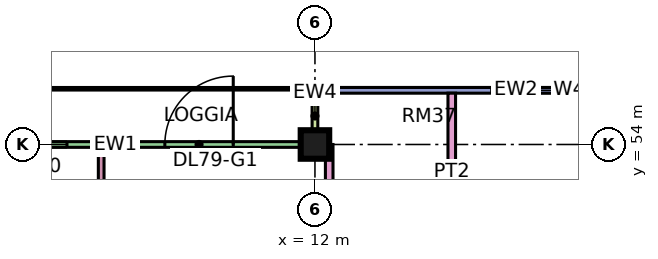
"""IFC4 building model, lengths in metres.
Left out: names, types, materials, properties, quantities, classifications, styles, units other than length and angle.
Written with IfcOpenShell. Run it as: python <this file> out.ifc"""

import sys

from ifc_helpers import new_model, si_unit, direction, frame, frame_2d, origin, origin_2d, place, context, subcontext, project, spatial, rectangle, extrude, element, fill, save


model = new_model("IFC4")
c1 = context("Model", 3, precision=1e-05, world=origin(), true_north=direction((0.0, 1.0)))
c2 = subcontext(c1, "Body", "Model", "MODEL_VIEW")
j1 = project(units=[si_unit("LENGTHUNIT", "METRE"), si_unit("PLANEANGLEUNIT", "RADIAN")], contexts=[c1])
p1 = place(None, origin())
s1 = spatial("IfcSite", under=j1, at=p1, CompositionType="ELEMENT")
p2 = place(p1, origin())
s2 = spatial("IfcBuilding", under=s1, at=p2, CompositionType="ELEMENT")
p3 = place(p2, frame((0.0, 0.0, 342.65)))
s3 = spatial("IfcBuildingStorey", under=s2, at=p3, CompositionType="ELEMENT", Elevation=342.65)
p4 = place(p3, frame((12.0, 54.0, 0.0), z_axis=(0.0, 0.0, 1.0), x_axis=(1.0, 0.0, 0.0)))
e1 = element("IfcColumn", 1, at=p4, inside=s3, PredefinedType="COLUMN", context=c2, shape_type="SweptSolid", body=[
    extrude(rectangle(XDim=0.75, YDim=0.75, at=origin_2d()), origin(), (0.0, 0.0, 1.0), 3.75),
])
p5 = place(p3, frame((22.5, 55.425, 0.0), z_axis=(0.0, 0.0, 1.0), x_axis=(-1.0, 0.0, 0.0)))
e2 = element("IfcWall", 2, at=p5, inside=s3, PredefinedType="SOLIDWALL", context=c2, shape_type="SweptSolid", body=[
    extrude(rectangle(XDim=10.425, YDim=0.15, at=frame_2d((5.212, 0.0))), origin(), (0.0, 0.0, 1.0), 3.35),
])
p6 = place(p5, frame((1.05, 0.0, 0.45)))
e3 = element("IfcOpeningElement", 3, at=p6, cuts=e2, PredefinedType="OPENING", context=c2, shape_type="SweptSolid", body=[
    extrude(rectangle(XDim=4.8, YDim=2.4, at=frame_2d((2.4, 1.2))), frame((0.0, 0.085, 0.0), z_axis=(0.0, -1.0, 0.0), x_axis=(1.0, 0.0, 0.0)), (0.0, 0.0, 1.0), 0.17),
])
p7 = place(p3, frame((11.925, 54.0, 0.0), z_axis=(0.0, 0.0, 1.0), x_axis=(-1.0, 0.0, 0.0)))
e4 = element("IfcWall", 4, at=p7, inside=s3, PredefinedType="SOLIDWALL", context=c2, shape_type="SweptSolid", body=[
    extrude(rectangle(XDim=10.35, YDim=0.15, at=frame_2d((5.175, 0.0))), origin(), (0.0, 0.0, 1.0), 3.35),
])
p8 = place(p7, frame((2.075, 0.0, 0.0)))
e5 = element("IfcOpeningElement", 5, at=p8, cuts=e4, PredefinedType="OPENING", context=c2, shape_type="SweptSolid", body=[
    extrude(rectangle(XDim=1.8, YDim=2.4, at=frame_2d((0.9, 1.2))), frame((0.0, 0.085, 0.0), z_axis=(0.0, -1.0, 0.0), x_axis=(1.0, 0.0, 0.0)), (0.0, 0.0, 1.0), 0.17),
])
p9 = place(p7, frame((6.45, 0.0, 0.45)))
e6 = element("IfcOpeningElement", 6, at=p9, cuts=e4, PredefinedType="OPENING", context=c2, shape_type="SweptSolid", body=[
    extrude(rectangle(XDim=3.0, YDim=2.4, at=frame_2d((1.5, 1.2))), frame((0.0, 0.085, 0.0), z_axis=(0.0, -1.0, 0.0), x_axis=(1.0, 0.0, 0.0)), (0.0, 0.0, 1.0), 0.17),
])
p10 = place(p3, frame((12.0, 55.5, 0.0), z_axis=(0.0, 0.0, 1.0), x_axis=(0.0, -1.0, 0.0)))
e7 = element("IfcWall", 7, at=p10, inside=s3, PredefinedType="SOLIDWALL", context=c2, shape_type="SweptSolid", body=[
    extrude(rectangle(XDim=1.5, YDim=0.15, at=frame_2d((0.75, 0.0))), origin(), (0.0, 0.0, 1.0), 3.35),
])
p11 = place(p3, frame((6.375, 41.95, 0.0), z_axis=(0.0, 0.0, 1.0), x_axis=(0.0, 1.0, 0.0)))
e8 = element("IfcWall", 8, at=p11, inside=s3, PredefinedType="PARTITIONING", context=c2, shape_type="SweptSolid", body=[
    extrude(rectangle(XDim=11.976, YDim=0.15, at=frame_2d((5.988, 0.0))), origin(), (0.0, 0.0, 1.0), 3.35),
])
p12 = place(p11, frame((4.1, 0.0, 0.0)))
e9 = element("IfcOpeningElement", 9, at=p12, cuts=e8, PredefinedType="OPENING", context=c2, shape_type="SweptSolid", body=[
    extrude(rectangle(XDim=0.9, YDim=2.1, at=frame_2d((0.45, 1.05))), frame((0.0, 0.085, 0.0), z_axis=(0.0, -1.0, 0.0), x_axis=(1.0, 0.0, 0.0)), (0.0, 0.0, 1.0), 0.17),
])
p13 = place(p11, frame((10.1, 0.0, 0.0)))
e10 = element("IfcOpeningElement", 10, at=p13, cuts=e8, PredefinedType="OPENING", context=c2, shape_type="SweptSolid", body=[
    extrude(rectangle(XDim=0.9, YDim=2.1, at=frame_2d((0.45, 1.05))), frame((0.0, 0.085, 0.0), z_axis=(0.0, -1.0, 0.0), x_axis=(1.0, 0.0, 0.0)), (0.0, 0.0, 1.0), 0.17),
])
p14 = place(p11, frame((1.1, 0.0, 0.0)))
e11 = element("IfcOpeningElement", 11, at=p14, cuts=e8, PredefinedType="OPENING", context=c2, shape_type="SweptSolid", body=[
    extrude(rectangle(XDim=0.9, YDim=2.1, at=frame_2d((0.45, 1.05))), frame((0.0, 0.085, 0.0), z_axis=(0.0, -1.0, 0.0), x_axis=(1.0, 0.0, 0.0)), (0.0, 0.0, 1.0), 0.17),
])
p15 = place(p3, frame((12.375, 20.0, 0.0), z_axis=(0.0, 0.0, 1.0), x_axis=(0.0, 1.0, 0.0)))
e12 = element("IfcWall", 12, at=p15, inside=s3, PredefinedType="PARTITIONING", context=c2, shape_type="SweptSolid", body=[
    extrude(rectangle(XDim=34.0, YDim=0.2, at=frame_2d((17.0, 0.0))), origin(), (0.0, 0.0, 1.0), 3.35),
])
p16 = place(p15, frame((31.8, 0.0, 0.0)))
e13 = element("IfcOpeningElement", 13, at=p16, cuts=e12, PredefinedType="OPENING", context=c2, shape_type="SweptSolid", body=[
    extrude(rectangle(XDim=1.0, YDim=2.1, at=frame_2d((0.5, 1.05))), frame((0.0, 0.11, 0.0), z_axis=(0.0, -1.0, 0.0), x_axis=(1.0, 0.0, 0.0)), (0.0, 0.0, 1.0), 0.22),
])
p17 = place(p15, frame((0.6, 0.0, 0.0)))
e14 = element("IfcOpeningElement", 14, at=p17, cuts=e12, PredefinedType="OPENING", context=c2, shape_type="SweptSolid", body=[
    extrude(rectangle(XDim=1.2, YDim=2.1, at=frame_2d((0.6, 1.05))), frame((0.0, 0.11, 0.0), z_axis=(0.0, -1.0, 0.0), x_axis=(1.0, 0.0, 0.0)), (0.0, 0.0, 1.0), 0.22),
])
p18 = place(p15, frame((14.1, 0.0, 0.0)))
e15 = element("IfcOpeningElement", 15, at=p18, cuts=e12, PredefinedType="OPENING", context=c2, shape_type="SweptSolid", body=[
    extrude(rectangle(XDim=1.0, YDim=2.1, at=frame_2d((0.5, 1.05))), frame((0.0, 0.11, 0.0), z_axis=(0.0, -1.0, 0.0), x_axis=(1.0, 0.0, 0.0)), (0.0, 0.0, 1.0), 0.22),
])
p19 = place(p3, frame((15.6, 51.225, 0.0), z_axis=(0.0, 0.0, 1.0), x_axis=(0.0, 1.0, 0.0)))
e16 = element("IfcWall", 16, at=p19, inside=s3, PredefinedType="PARTITIONING", context=c2, shape_type="SweptSolid", body=[
    extrude(rectangle(XDim=4.125, YDim=0.2, at=frame_2d((2.062, 0.0))), origin(), (0.0, 0.0, 1.0), 3.35),
])
p20 = place(p6, origin())
e17 = element("IfcWindow", 17, at=p20, inside=s3, PartitioningType="SINGLE_PANEL", PredefinedType="WINDOW", context=c2, shape_type="SweptSolid", body=[
    extrude(rectangle(XDim=4.8, YDim=2.4, at=frame_2d((2.4, 1.2))), frame((0.0, 0.03, 0.0), z_axis=(0.0, -1.0, 0.0), x_axis=(1.0, 0.0, 0.0)), (0.0, 0.0, 1.0), 0.06),
])
fill(e3, e17)
p21 = place(p8, frame((1.8, 0.0, 0.0), z_axis=(0.0, 0.0, 1.0), x_axis=(-1.0, 0.0, 0.0)))
e18 = element("IfcDoor", 18, at=p21, inside=s3, OperationType="DOUBLE_DOOR_SINGLE_SWING", PredefinedType="DOOR", context=c2, shape_type="SweptSolid", body=[
    extrude(rectangle(XDim=1.8, YDim=2.4, at=frame_2d((0.9, 1.2))), frame((0.0, 0.025, 0.0), z_axis=(0.0, -1.0, 0.0), x_axis=(1.0, 0.0, 0.0)), (0.0, 0.0, 1.0), 0.05),
])
fill(e5, e18)
p22 = place(p9, origin())
e19 = element("IfcWindow", 19, at=p22, inside=s3, PartitioningType="SINGLE_PANEL", PredefinedType="WINDOW", context=c2, shape_type="SweptSolid", body=[
    extrude(rectangle(XDim=3.0, YDim=2.4, at=frame_2d((1.5, 1.2))), frame((0.0, 0.03, 0.0), z_axis=(0.0, -1.0, 0.0), x_axis=(1.0, 0.0, 0.0)), (0.0, 0.0, 1.0), 0.06),
])
fill(e6, e19)
save(model, sys.argv[1])
